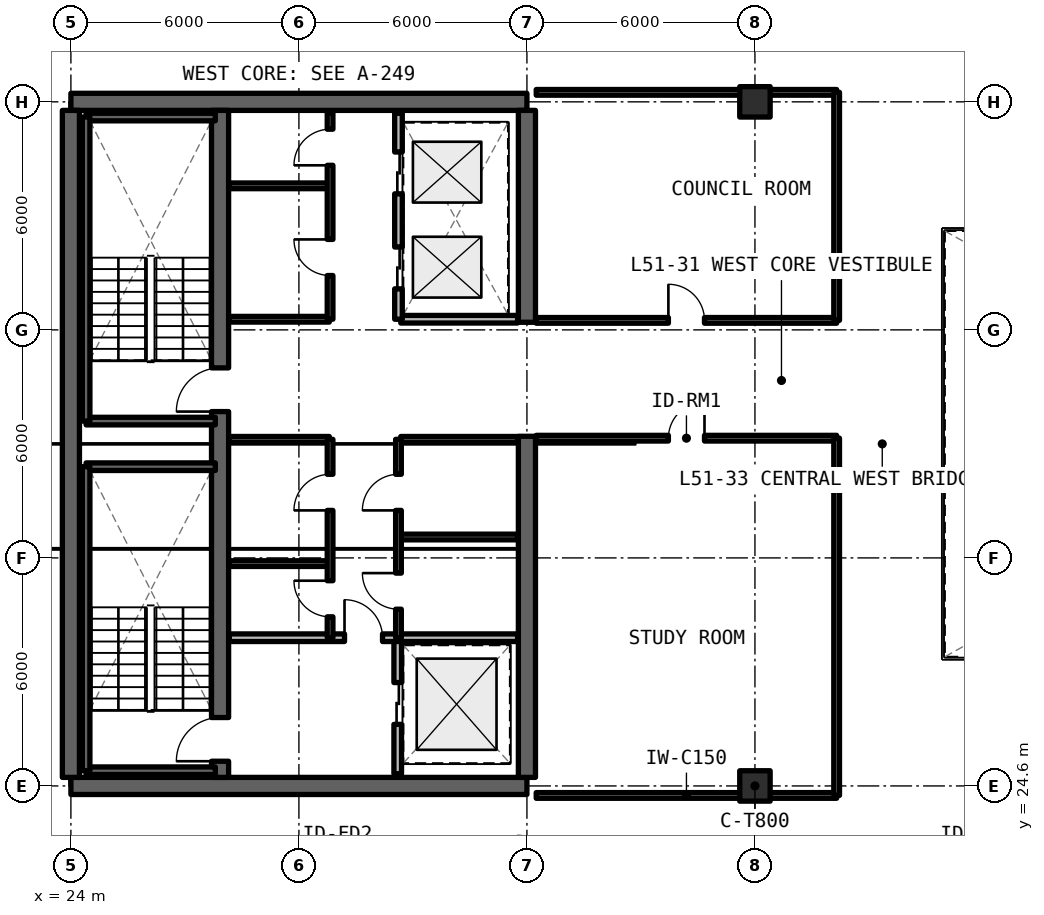
"""IFC4 building model, lengths in metres.
Left out: names, types, materials, properties, quantities, classifications, styles, units other than length and angle.
Written with IfcOpenShell. Run it as: python <this file> out.ifc"""

import sys

from ifc_helpers import new_model, si_unit, direction, frame, frame_2d, origin, origin_2d, place, context, subcontext, project, spatial, rectangle, extrude, element, fill, save


model = new_model("IFC4")
c1 = context("Model", 3, precision=1e-05, world=origin(), true_north=direction((0.0, 1.0)))
c2 = subcontext(c1, "Body", "Model", "MODEL_VIEW")
j1 = project(units=[si_unit("LENGTHUNIT", "METRE"), si_unit("PLANEANGLEUNIT", "RADIAN")], contexts=[c1])
p1 = place(None, origin())
s1 = spatial("IfcSite", under=j1, at=p1, CompositionType="ELEMENT")
p2 = place(p1, origin())
s2 = spatial("IfcBuilding", under=s1, at=p2, CompositionType="ELEMENT")
p3 = place(p2, frame((0.0, 0.0, 185.13)))
s3 = spatial("IfcBuildingStorey", under=s2, at=p3, CompositionType="ELEMENT", Elevation=185.13)
for number, where, z_axis, x_axis in (
    (1, (24.0, 24.6, 0.0), (0.0, 0.0, 1.0), (1.0, 0.0, 0.0)),
    (2, (36.0, 42.6, 0.0), (0.0, 0.0, 1.0), (-1.0, 0.0, 0.0)),
):
    element("IfcWall", number, at=place(p3, frame(where, z_axis=z_axis, x_axis=x_axis)), inside=s3, PredefinedType="SHEAR", context=c2, shape_type="SweptSolid", body=[
        extrude(rectangle(XDim=12.0, YDim=0.45, at=frame_2d((6.0, 0.0))), origin(), (0.0, 0.0, 1.0), 3.3),
    ])
p4 = place(p3, frame((24.0, 24.825, 0.0), z_axis=(0.0, 0.0, 1.0), x_axis=(0.0, 1.0, 0.0)))
e3 = element("IfcWall", 3, at=p4, inside=s3, PredefinedType="SHEAR", context=c2, shape_type="SweptSolid", body=[
    extrude(rectangle(XDim=17.55, YDim=0.45, at=frame_2d((8.775, 0.0))), origin(), (0.0, 0.0, 1.0), 3.3),
])
p5 = place(p3, frame((36.0, 24.825, 0.0), z_axis=(0.0, 0.0, 1.0), x_axis=(0.0, 1.0, 0.0)))
e4 = element("IfcWall", 4, at=p5, inside=s3, PredefinedType="SHEAR", context=c2, shape_type="SweptSolid", body=[
    extrude(rectangle(XDim=8.975, YDim=0.45, at=frame_2d((4.488, 0.0))), origin(), (0.0, 0.0, 1.0), 3.3),
])
p6 = place(p3, frame((36.0, 36.8, 0.0), z_axis=(0.0, 0.0, 1.0), x_axis=(0.0, 1.0, 0.0)))
e5 = element("IfcWall", 5, at=p6, inside=s3, PredefinedType="SHEAR", context=c2, shape_type="SweptSolid", body=[
    extrude(rectangle(XDim=5.575, YDim=0.45, at=frame_2d((2.788, 0.0))), origin(), (0.0, 0.0, 1.0), 3.3),
])
p7 = place(p3, frame((27.925, 24.825, 0.0), z_axis=(0.0, 0.0, 1.0), x_axis=(0.0, 1.0, 0.0)))
e6 = element("IfcWall", 6, at=p7, inside=s3, PredefinedType="SHEAR", context=c2, shape_type="SweptSolid", body=[
    extrude(rectangle(XDim=17.55, YDim=0.45, at=frame_2d((8.775, 0.0))), origin(), (0.0, 0.0, 1.0), 3.3),
])
p8 = place(p7, frame((0.425, 0.0, 0.0)))
e7 = element("IfcOpeningElement", 7, at=p8, cuts=e6, PredefinedType="OPENING", context=c2, shape_type="SweptSolid", body=[
    extrude(rectangle(XDim=1.15, YDim=2.15, at=frame_2d((0.575, 1.075))), frame((0.0, 0.235, 0.0), z_axis=(0.0, -1.0, 0.0), x_axis=(1.0, 0.0, 0.0)), (0.0, 0.0, 1.0), 0.47),
])
p9 = place(p7, frame((9.625, 0.0, 0.0)))
e8 = element("IfcOpeningElement", 8, at=p9, cuts=e6, PredefinedType="OPENING", context=c2, shape_type="SweptSolid", body=[
    extrude(rectangle(XDim=1.15, YDim=2.15, at=frame_2d((0.575, 1.075))), frame((0.0, 0.235, 0.0), z_axis=(0.0, -1.0, 0.0), x_axis=(1.0, 0.0, 0.0)), (0.0, 0.0, 1.0), 0.47),
])
for number, where, z_axis, x_axis in (
    (9, (42.0, 24.6, 0.0), (0.0, 0.0, 1.0), (1.0, 0.0, 0.0)),
    (10, (42.0, 42.6, 0.0), (0.0, 0.0, 1.0), (1.0, 0.0, 0.0)),
):
    element("IfcColumn", number, at=place(p3, frame(where, z_axis=z_axis, x_axis=x_axis)), inside=s3, PredefinedType="COLUMN", context=c2, shape_type="SweptSolid", body=[
        extrude(rectangle(XDim=0.8, YDim=0.8, at=origin_2d()), origin(), (0.0, 0.0, 1.0), 3.3),
    ])
p10 = place(p3, frame((32.6, 24.92, 0.0), z_axis=(0.0, 0.0, 1.0), x_axis=(0.0, 1.0, 0.0)))
e11 = element("IfcWall", 11, at=p10, inside=s3, PredefinedType="SOLIDWALL", context=c2, shape_type="SweptSolid", body=[
    extrude(rectangle(XDim=3.58, YDim=0.2, at=frame_2d((1.79, 0.0))), origin(), (0.0, 0.0, 1.0), 2.35),
])
p11 = place(p10, frame((1.3, 0.0, 0.0)))
e12 = element("IfcOpeningElement", 12, at=p11, cuts=e11, PredefinedType="OPENING", context=c2, shape_type="SweptSolid", body=[
    extrude(rectangle(XDim=1.1, YDim=2.2, at=frame_2d((0.55, 1.1))), frame((0.0, 0.11, 0.0), z_axis=(0.0, -1.0, 0.0), x_axis=(1.0, 0.0, 0.0)), (0.0, 0.0, 1.0), 0.22),
])
p12 = place(p3, frame((28.17, 28.5, 0.0), z_axis=(0.0, 0.0, 1.0), x_axis=(1.0, 0.0, 0.0)))
e13 = element("IfcWall", 13, at=p12, inside=s3, PredefinedType="SOLIDWALL", context=c2, shape_type="SweptSolid", body=[
    extrude(rectangle(XDim=7.585, YDim=0.2, at=frame_2d((3.792, 0.0))), origin(), (0.0, 0.0, 1.0), 2.35),
])
p13 = place(p12, frame((3.03, 0.0, 0.0)))
e14 = element("IfcOpeningElement", 14, at=p13, cuts=e13, PredefinedType="OPENING", context=c2, shape_type="SweptSolid", body=[
    extrude(rectangle(XDim=1.0, YDim=2.15, at=frame_2d((0.5, 1.075))), frame((0.0, 0.11, 0.0), z_axis=(0.0, -1.0, 0.0), x_axis=(1.0, 0.0, 0.0)), (0.0, 0.0, 1.0), 0.22),
])
for number, where, z_axis, x_axis in (
    (15, (28.17, 30.45, 0.0), (0.0, 0.0, 1.0), (1.0, 0.0, 0.0)),
    (16, (28.17, 33.72, 0.0), (0.0, 0.0, 1.0), (1.0, 0.0, 0.0)),
):
    element("IfcWall", number, at=place(p3, frame(where, z_axis=z_axis, x_axis=x_axis)), inside=s3, PredefinedType="SOLIDWALL", context=c2, shape_type="SweptSolid", body=[
        extrude(rectangle(XDim=2.63, YDim=0.15, at=frame_2d((1.315, 0.0))), origin(), (0.0, 0.0, 1.0), 2.35),
    ])
p14 = place(p3, frame((30.82, 28.5, 0.0), z_axis=(0.0, 0.0, 1.0), x_axis=(0.0, 1.0, 0.0)))
e17 = element("IfcWall", 17, at=p14, inside=s3, PredefinedType="SOLIDWALL", context=c2, shape_type="SweptSolid", body=[
    extrude(rectangle(XDim=5.22, YDim=0.15, at=frame_2d((2.61, 0.0))), origin(), (0.0, 0.0, 1.0), 2.35),
])
p15 = place(p14, frame((0.55, 0.0, 0.0)))
e18 = element("IfcOpeningElement", 18, at=p15, cuts=e17, PredefinedType="OPENING", context=c2, shape_type="SweptSolid", body=[
    extrude(rectangle(XDim=0.95, YDim=2.15, at=frame_2d((0.475, 1.075))), frame((0.0, 0.085, 0.0), z_axis=(0.0, -1.0, 0.0), x_axis=(1.0, 0.0, 0.0)), (0.0, 0.0, 1.0), 0.17),
])
p16 = place(p14, frame((3.35, 0.0, 0.0)))
e19 = element("IfcOpeningElement", 19, at=p16, cuts=e17, PredefinedType="OPENING", context=c2, shape_type="SweptSolid", body=[
    extrude(rectangle(XDim=0.95, YDim=2.15, at=frame_2d((0.475, 1.075))), frame((0.0, 0.085, 0.0), z_axis=(0.0, -1.0, 0.0), x_axis=(1.0, 0.0, 0.0)), (0.0, 0.0, 1.0), 0.17),
])
for number, where, z_axis, x_axis in (
    (20, (32.68, 31.15, 0.0), (0.0, 0.0, 1.0), (1.0, 0.0, 0.0)),
    (21, (32.68, 33.72, 0.0), (0.0, 0.0, 1.0), (1.0, 0.0, 0.0)),
):
    element("IfcWall", number, at=place(p3, frame(where, z_axis=z_axis, x_axis=x_axis)), inside=s3, PredefinedType="SOLIDWALL", context=c2, shape_type="SweptSolid", body=[
        extrude(rectangle(XDim=3.075, YDim=0.15, at=frame_2d((1.538, 0.0))), origin(), (0.0, 0.0, 1.0), 2.35),
    ])
p17 = place(p3, frame((32.62, 28.5, 0.0), z_axis=(0.0, 0.0, 1.0), x_axis=(0.0, 1.0, 0.0)))
e22 = element("IfcWall", 22, at=p17, inside=s3, PredefinedType="SOLIDWALL", context=c2, shape_type="SweptSolid", body=[
    extrude(rectangle(XDim=5.22, YDim=0.15, at=frame_2d((2.61, 0.0))), origin(), (0.0, 0.0, 1.0), 2.35),
])
p18 = place(p17, frame((0.75, 0.0, 0.0)))
e23 = element("IfcOpeningElement", 23, at=p18, cuts=e22, PredefinedType="OPENING", context=c2, shape_type="SweptSolid", body=[
    extrude(rectangle(XDim=0.95, YDim=2.15, at=frame_2d((0.475, 1.075))), frame((0.0, 0.085, 0.0), z_axis=(0.0, -1.0, 0.0), x_axis=(1.0, 0.0, 0.0)), (0.0, 0.0, 1.0), 0.17),
])
p19 = place(p17, frame((3.35, 0.0, 0.0)))
e24 = element("IfcOpeningElement", 24, at=p19, cuts=e22, PredefinedType="OPENING", context=c2, shape_type="SweptSolid", body=[
    extrude(rectangle(XDim=0.95, YDim=2.15, at=frame_2d((0.475, 1.075))), frame((0.0, 0.085, 0.0), z_axis=(0.0, -1.0, 0.0), x_axis=(1.0, 0.0, 0.0)), (0.0, 0.0, 1.0), 0.17),
])
for number, where, z_axis, x_axis in (
    (25, (28.17, 36.88, 0.0), (0.0, 0.0, 1.0), (1.0, 0.0, 0.0)),
    (26, (28.17, 40.39, 0.0), (0.0, 0.0, 1.0), (1.0, 0.0, 0.0)),
):
    element("IfcWall", number, at=place(p3, frame(where, z_axis=z_axis, x_axis=x_axis)), inside=s3, PredefinedType="SOLIDWALL", context=c2, shape_type="SweptSolid", body=[
        extrude(rectangle(XDim=2.63, YDim=0.15, at=frame_2d((1.315, 0.0))), origin(), (0.0, 0.0, 1.0), 2.35),
    ])
p20 = place(p3, frame((30.82, 36.88, 0.0), z_axis=(0.0, 0.0, 1.0), x_axis=(0.0, 1.0, 0.0)))
e27 = element("IfcWall", 27, at=p20, inside=s3, PredefinedType="SOLIDWALL", context=c2, shape_type="SweptSolid", body=[
    extrude(rectangle(XDim=5.42, YDim=0.15, at=frame_2d((2.71, 0.0))), origin(), (0.0, 0.0, 1.0), 2.35),
])
p21 = place(p20, frame((1.15, 0.0, 0.0)))
e28 = element("IfcOpeningElement", 28, at=p21, cuts=e27, PredefinedType="OPENING", context=c2, shape_type="SweptSolid", body=[
    extrude(rectangle(XDim=0.95, YDim=2.15, at=frame_2d((0.475, 1.075))), frame((0.0, 0.085, 0.0), z_axis=(0.0, -1.0, 0.0), x_axis=(1.0, 0.0, 0.0)), (0.0, 0.0, 1.0), 0.17),
])
p22 = place(p20, frame((4.05, 0.0, 0.0)))
e29 = element("IfcOpeningElement", 29, at=p22, cuts=e27, PredefinedType="OPENING", context=c2, shape_type="SweptSolid", body=[
    extrude(rectangle(XDim=0.95, YDim=2.15, at=frame_2d((0.475, 1.075))), frame((0.0, 0.085, 0.0), z_axis=(0.0, -1.0, 0.0), x_axis=(1.0, 0.0, 0.0)), (0.0, 0.0, 1.0), 0.17),
])
p23 = place(p3, frame((32.68, 36.88, 0.0), z_axis=(0.0, 0.0, 1.0), x_axis=(1.0, 0.0, 0.0)))
e30 = element("IfcWall", 30, at=p23, inside=s3, PredefinedType="SOLIDWALL", context=c2, shape_type="SweptSolid", body=[
    extrude(rectangle(XDim=3.075, YDim=0.2, at=frame_2d((1.538, 0.0))), origin(), (0.0, 0.0, 1.0), 2.35),
])
p24 = place(p3, frame((32.62, 36.88, 0.0), z_axis=(0.0, 0.0, 1.0), x_axis=(0.0, 1.0, 0.0)))
e31 = element("IfcWall", 31, at=p24, inside=s3, PredefinedType="SOLIDWALL", context=c2, shape_type="SweptSolid", body=[
    extrude(rectangle(XDim=5.42, YDim=0.2, at=frame_2d((2.71, 0.0))), origin(), (0.0, 0.0, 1.0), 2.35),
])
p25 = place(p24, frame((0.8, 0.0, 0.0)))
e32 = element("IfcOpeningElement", 32, at=p25, cuts=e31, PredefinedType="OPENING", context=c2, shape_type="SweptSolid", body=[
    extrude(rectangle(XDim=1.1, YDim=2.2, at=frame_2d((0.55, 1.1))), frame((0.0, 0.11, 0.0), z_axis=(0.0, -1.0, 0.0), x_axis=(1.0, 0.0, 0.0)), (0.0, 0.0, 1.0), 0.22),
])
p26 = place(p24, frame((3.3, 0.0, 0.0)))
e33 = element("IfcOpeningElement", 33, at=p26, cuts=e31, PredefinedType="OPENING", context=c2, shape_type="SweptSolid", body=[
    extrude(rectangle(XDim=1.1, YDim=2.2, at=frame_2d((0.55, 1.1))), frame((0.0, 0.11, 0.0), z_axis=(0.0, -1.0, 0.0), x_axis=(1.0, 0.0, 0.0)), (0.0, 0.0, 1.0), 0.22),
])
p27 = place(p3, frame((36.245, 24.35, 0.0), z_axis=(0.0, 0.0, 1.0), x_axis=(1.0, 0.0, 0.0)))
e34 = element("IfcWall", 34, at=p27, inside=s3, PredefinedType="SOLIDWALL", context=c2, shape_type="SweptSolid", body=[
    extrude(rectangle(XDim=7.905, YDim=0.15, at=frame_2d((3.952, 0.0))), origin(), (0.0, 0.0, 1.0), 2.35),
])
p28 = place(p3, frame((36.245, 33.75, 0.0), z_axis=(0.0, 0.0, 1.0), x_axis=(1.0, 0.0, 0.0)))
e35 = element("IfcWall", 35, at=p28, inside=s3, PredefinedType="SOLIDWALL", context=c2, shape_type="SweptSolid", body=[
    extrude(rectangle(XDim=7.905, YDim=0.15, at=frame_2d((3.952, 0.0))), origin(), (0.0, 0.0, 1.0), 2.35),
])
p29 = place(p28, frame((3.478, 0.0, 0.0)))
e36 = element("IfcOpeningElement", 36, at=p29, cuts=e35, PredefinedType="OPENING", context=c2, shape_type="SweptSolid", body=[
    extrude(rectangle(XDim=0.95, YDim=2.15, at=frame_2d((0.475, 1.075))), frame((0.0, 0.085, 0.0), z_axis=(0.0, -1.0, 0.0), x_axis=(1.0, 0.0, 0.0)), (0.0, 0.0, 1.0), 0.17),
])
p30 = place(p3, frame((44.15, 24.35, 0.0), z_axis=(0.0, 0.0, 1.0), x_axis=(0.0, 1.0, 0.0)))
e37 = element("IfcWall", 37, at=p30, inside=s3, PredefinedType="SOLIDWALL", context=c2, shape_type="SweptSolid", body=[
    extrude(rectangle(XDim=9.4, YDim=0.15, at=frame_2d((4.7, 0.0))), origin(), (0.0, 0.0, 1.0), 2.35),
])
p31 = place(p3, frame((36.245, 36.85, 0.0), z_axis=(0.0, 0.0, 1.0), x_axis=(1.0, 0.0, 0.0)))
e38 = element("IfcWall", 38, at=p31, inside=s3, PredefinedType="SOLIDWALL", context=c2, shape_type="SweptSolid", body=[
    extrude(rectangle(XDim=7.905, YDim=0.15, at=frame_2d((3.952, 0.0))), origin(), (0.0, 0.0, 1.0), 2.35),
])
p32 = place(p31, frame((3.478, 0.0, 0.0)))
e39 = element("IfcOpeningElement", 39, at=p32, cuts=e38, PredefinedType="OPENING", context=c2, shape_type="SweptSolid", body=[
    extrude(rectangle(XDim=0.95, YDim=2.15, at=frame_2d((0.475, 1.075))), frame((0.0, 0.085, 0.0), z_axis=(0.0, -1.0, 0.0), x_axis=(1.0, 0.0, 0.0)), (0.0, 0.0, 1.0), 0.17),
])
p33 = place(p3, frame((36.245, 42.85, 0.0), z_axis=(0.0, 0.0, 1.0), x_axis=(1.0, 0.0, 0.0)))
e40 = element("IfcWall", 40, at=p33, inside=s3, PredefinedType="SOLIDWALL", context=c2, shape_type="SweptSolid", body=[
    extrude(rectangle(XDim=7.905, YDim=0.15, at=frame_2d((3.952, 0.0))), origin(), (0.0, 0.0, 1.0), 2.35),
])
p34 = place(p3, frame((44.15, 36.85, 0.0), z_axis=(0.0, 0.0, 1.0), x_axis=(0.0, 1.0, 0.0)))
e41 = element("IfcWall", 41, at=p34, inside=s3, PredefinedType="SOLIDWALL", context=c2, shape_type="SweptSolid", body=[
    extrude(rectangle(XDim=6.0, YDim=0.15, at=frame_2d((3.0, 0.0))), origin(), (0.0, 0.0, 1.0), 2.35),
])
for number, where, z_axis, x_axis in (
    (42, (24.4, 25.0, 0.0), (0.0, 0.0, 1.0), (1.0, 0.0, 0.0)),
    (43, (27.8, 33.0, 0.0), (0.0, 0.0, 1.0), (-1.0, 0.0, 0.0)),
):
    element("IfcWall", number, at=place(p3, frame(where, z_axis=z_axis, x_axis=x_axis)), inside=s3, PredefinedType="SOLIDWALL", context=c2, shape_type="SweptSolid", body=[
        extrude(rectangle(XDim=3.4, YDim=0.2, at=frame_2d((1.7, 0.0))), origin(), (0.0, 0.0, 1.0), 3.3),
    ])
p35 = place(p3, frame((24.4, 33.0, 0.0), z_axis=(0.0, 0.0, 1.0), x_axis=(0.0, -1.0, 0.0)))
e44 = element("IfcWall", 44, at=p35, inside=s3, PredefinedType="SOLIDWALL", context=c2, shape_type="SweptSolid", body=[
    extrude(rectangle(XDim=8.0, YDim=0.2, at=frame_2d((4.0, 0.0))), origin(), (0.0, 0.0, 1.0), 3.3),
])
for number, where, z_axis, x_axis in (
    (45, (24.4, 34.2, 0.0), (0.0, 0.0, 1.0), (1.0, 0.0, 0.0)),
    (46, (27.8, 42.2, 0.0), (0.0, 0.0, 1.0), (-1.0, 0.0, 0.0)),
):
    element("IfcWall", number, at=place(p3, frame(where, z_axis=z_axis, x_axis=x_axis)), inside=s3, PredefinedType="SOLIDWALL", context=c2, shape_type="SweptSolid", body=[
        extrude(rectangle(XDim=3.4, YDim=0.2, at=frame_2d((1.7, 0.0))), origin(), (0.0, 0.0, 1.0), 3.3),
    ])
p36 = place(p3, frame((24.4, 42.2, 0.0), z_axis=(0.0, 0.0, 1.0), x_axis=(0.0, -1.0, 0.0)))
e47 = element("IfcWall", 47, at=p36, inside=s3, PredefinedType="SOLIDWALL", context=c2, shape_type="SweptSolid", body=[
    extrude(rectangle(XDim=8.0, YDim=0.2, at=frame_2d((4.0, 0.0))), origin(), (0.0, 0.0, 1.0), 3.3),
])
p37 = place(p11, origin())
e48 = element("IfcDoor", 48, at=p37, inside=s3, OperationType="SLIDING_TO_LEFT", PredefinedType="DOOR", context=c2, shape_type="SweptSolid", body=[
    extrude(rectangle(XDim=1.1, YDim=2.2, at=frame_2d((0.55, 1.1))), frame((0.0, 0.025, 0.0), z_axis=(0.0, -1.0, 0.0), x_axis=(1.0, 0.0, 0.0)), (0.0, 0.0, 1.0), 0.05),
])
fill(e12, e48)
p38 = place(p13, origin())
e49 = element("IfcDoor", 49, at=p38, inside=s3, OperationType="SINGLE_SWING_LEFT", PredefinedType="DOOR", context=c2, shape_type="SweptSolid", body=[
    extrude(rectangle(XDim=1.0, YDim=2.15, at=frame_2d((0.5, 1.075))), frame((0.0, 0.025, 0.0), z_axis=(0.0, -1.0, 0.0), x_axis=(1.0, 0.0, 0.0)), (0.0, 0.0, 1.0), 0.05),
])
fill(e14, e49)
p39 = place(p15, origin())
e50 = element("IfcDoor", 50, at=p39, inside=s3, OperationType="SINGLE_SWING_RIGHT", PredefinedType="DOOR", context=c2, shape_type="SweptSolid", body=[
    extrude(rectangle(XDim=0.95, YDim=2.15, at=frame_2d((0.475, 1.075))), frame((0.0, 0.025, 0.0), z_axis=(0.0, -1.0, 0.0), x_axis=(1.0, 0.0, 0.0)), (0.0, 0.0, 1.0), 0.05),
])
fill(e18, e50)
p40 = place(p16, origin())
e51 = element("IfcDoor", 51, at=p40, inside=s3, OperationType="SINGLE_SWING_LEFT", PredefinedType="DOOR", context=c2, shape_type="SweptSolid", body=[
    extrude(rectangle(XDim=0.95, YDim=2.15, at=frame_2d((0.475, 1.075))), frame((0.0, 0.025, 0.0), z_axis=(0.0, -1.0, 0.0), x_axis=(1.0, 0.0, 0.0)), (0.0, 0.0, 1.0), 0.05),
])
fill(e19, e51)
p41 = place(p18, origin())
e52 = element("IfcDoor", 52, at=p41, inside=s3, OperationType="SINGLE_SWING_RIGHT", PredefinedType="DOOR", context=c2, shape_type="SweptSolid", body=[
    extrude(rectangle(XDim=0.95, YDim=2.15, at=frame_2d((0.475, 1.075))), frame((0.0, 0.025, 0.0), z_axis=(0.0, -1.0, 0.0), x_axis=(1.0, 0.0, 0.0)), (0.0, 0.0, 1.0), 0.05),
])
fill(e23, e52)
p42 = place(p19, origin())
e53 = element("IfcDoor", 53, at=p42, inside=s3, OperationType="SINGLE_SWING_LEFT", PredefinedType="DOOR", context=c2, shape_type="SweptSolid", body=[
    extrude(rectangle(XDim=0.95, YDim=2.15, at=frame_2d((0.475, 1.075))), frame((0.0, 0.025, 0.0), z_axis=(0.0, -1.0, 0.0), x_axis=(1.0, 0.0, 0.0)), (0.0, 0.0, 1.0), 0.05),
])
fill(e24, e53)
p43 = place(p21, origin())
e54 = element("IfcDoor", 54, at=p43, inside=s3, OperationType="SINGLE_SWING_RIGHT", PredefinedType="DOOR", context=c2, shape_type="SweptSolid", body=[
    extrude(rectangle(XDim=0.95, YDim=2.15, at=frame_2d((0.475, 1.075))), frame((0.0, 0.025, 0.0), z_axis=(0.0, -1.0, 0.0), x_axis=(1.0, 0.0, 0.0)), (0.0, 0.0, 1.0), 0.05),
])
fill(e28, e54)
p44 = place(p22, origin())
e55 = element("IfcDoor", 55, at=p44, inside=s3, OperationType="SINGLE_SWING_LEFT", PredefinedType="DOOR", context=c2, shape_type="SweptSolid", body=[
    extrude(rectangle(XDim=0.95, YDim=2.15, at=frame_2d((0.475, 1.075))), frame((0.0, 0.025, 0.0), z_axis=(0.0, -1.0, 0.0), x_axis=(1.0, 0.0, 0.0)), (0.0, 0.0, 1.0), 0.05),
])
fill(e29, e55)
p45 = place(p25, origin())
e56 = element("IfcDoor", 56, at=p45, inside=s3, OperationType="SLIDING_TO_LEFT", PredefinedType="DOOR", context=c2, shape_type="SweptSolid", body=[
    extrude(rectangle(XDim=1.1, YDim=2.2, at=frame_2d((0.55, 1.1))), frame((0.0, 0.025, 0.0), z_axis=(0.0, -1.0, 0.0), x_axis=(1.0, 0.0, 0.0)), (0.0, 0.0, 1.0), 0.05),
])
fill(e32, e56)
p46 = place(p26, origin())
e57 = element("IfcDoor", 57, at=p46, inside=s3, OperationType="SLIDING_TO_RIGHT", PredefinedType="DOOR", context=c2, shape_type="SweptSolid", body=[
    extrude(rectangle(XDim=1.1, YDim=2.2, at=frame_2d((0.55, 1.1))), frame((0.0, 0.025, 0.0), z_axis=(0.0, -1.0, 0.0), x_axis=(1.0, 0.0, 0.0)), (0.0, 0.0, 1.0), 0.05),
])
fill(e33, e57)
p47 = place(p29, origin())
e58 = element("IfcDoor", 58, at=p47, inside=s3, OperationType="SINGLE_SWING_RIGHT", PredefinedType="DOOR", context=c2, shape_type="SweptSolid", body=[
    extrude(rectangle(XDim=0.95, YDim=2.15, at=frame_2d((0.475, 1.075))), frame((0.0, 0.025, 0.0), z_axis=(0.0, -1.0, 0.0), x_axis=(1.0, 0.0, 0.0)), (0.0, 0.0, 1.0), 0.05),
])
fill(e36, e58)
p48 = place(p32, origin())
e59 = element("IfcDoor", 59, at=p48, inside=s3, OperationType="SINGLE_SWING_LEFT", PredefinedType="DOOR", context=c2, shape_type="SweptSolid", body=[
    extrude(rectangle(XDim=0.95, YDim=2.15, at=frame_2d((0.475, 1.075))), frame((0.0, 0.025, 0.0), z_axis=(0.0, -1.0, 0.0), x_axis=(1.0, 0.0, 0.0)), (0.0, 0.0, 1.0), 0.05),
])
fill(e39, e59)
p49 = place(p8, origin())
e60 = element("IfcDoor", 60, at=p49, inside=s3, OperationType="SINGLE_SWING_LEFT", PredefinedType="DOOR", context=c2, shape_type="SweptSolid", body=[
    extrude(rectangle(XDim=1.15, YDim=2.15, at=frame_2d((0.575, 1.075))), frame((0.0, 0.025, 0.0), z_axis=(0.0, -1.0, 0.0), x_axis=(1.0, 0.0, 0.0)), (0.0, 0.0, 1.0), 0.05),
])
fill(e7, e60)
p50 = place(p9, origin())
e61 = element("IfcDoor", 61, at=p50, inside=s3, OperationType="SINGLE_SWING_RIGHT", PredefinedType="DOOR", context=c2, shape_type="SweptSolid", body=[
    extrude(rectangle(XDim=1.15, YDim=2.15, at=frame_2d((0.575, 1.075))), frame((0.0, 0.025, 0.0), z_axis=(0.0, -1.0, 0.0), x_axis=(1.0, 0.0, 0.0)), (0.0, 0.0, 1.0), 0.05),
])
fill(e8, e61)
save(model, sys.argv[1])
